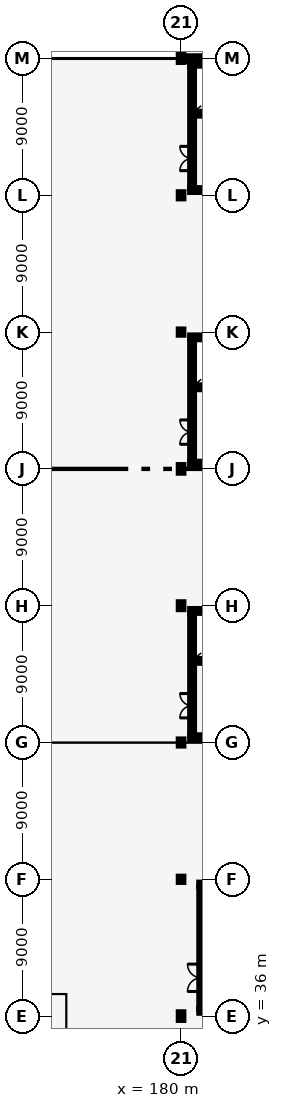
"""IFC4 building model, lengths in metres.
Left out: names, types, materials, properties, quantities, classifications, styles, units other than length and angle.
Written with IfcOpenShell. Run it as: python <this file> out.ifc"""

import sys

from ifc_helpers import new_model, si_unit, direction, frame, frame_2d, origin, origin_2d, place, context, subcontext, project, spatial, rectangle, i_section, extrude, element, fill, save


model = new_model("IFC4")
c1 = context("Model", 3, precision=1e-05, world=origin(), true_north=direction((0.0, 1.0)))
c2 = subcontext(c1, "Body", "Model", "MODEL_VIEW")
j1 = project(units=[si_unit("LENGTHUNIT", "METRE"), si_unit("PLANEANGLEUNIT", "RADIAN")], contexts=[c1])
p1 = place(None, origin())
s1 = spatial("IfcSite", under=j1, at=p1, CompositionType="ELEMENT")
p2 = place(p1, origin())
s2 = spatial("IfcBuilding", under=s1, at=p2, CompositionType="ELEMENT")
p3 = place(p2, frame((0.0, 0.0, 18.0)))
s3 = spatial("IfcBuildingStorey", under=s2, at=p3, CompositionType="ELEMENT", Elevation=18.0)
p4 = place(p3, frame((180.0, 36.0, 0.0), z_axis=(0.0, 0.0, 1.0), x_axis=(1.0, 0.0, 0.0)))
e1 = element("IfcColumn", 1, at=p4, inside=s3, PredefinedType="COLUMN", context=c2, shape_type="SweptSolid", body=[
    extrude(i_section(OverallWidth=0.3, OverallDepth=0.5, WebThickness=0.014, FlangeThickness=0.028, FilletRadius=0.027, at=origin_2d()), origin(), (0.0, 0.0, 1.0), 4.8),
])
p5 = place(p3, frame((180.0, 45.0, 0.0), z_axis=(0.0, 0.0, 1.0), x_axis=(1.0, 0.0, 0.0)))
e2 = element("IfcColumn", 2, at=p5, inside=s3, PredefinedType="COLUMN", context=c2, shape_type="SweptSolid", body=[
    extrude(i_section(OverallWidth=0.3, OverallDepth=0.34, WebThickness=0.012, FlangeThickness=0.021, FilletRadius=0.027, at=origin_2d()), origin(), (0.0, 0.0, 1.0), 4.8),
])
p6 = place(p3, frame((180.0, 54.0, 0.0), z_axis=(0.0, 0.0, 1.0), x_axis=(1.0, 0.0, 0.0)))
e3 = element("IfcColumn", 3, at=p6, inside=s3, PredefinedType="COLUMN", context=c2, shape_type="SweptSolid", body=[
    extrude(i_section(OverallWidth=0.3, OverallDepth=0.4, WebThickness=0.013, FlangeThickness=0.024, FilletRadius=0.027, at=origin_2d()), origin(), (0.0, 0.0, 1.0), 4.8),
])
p7 = place(p3, frame((180.0, 63.0, 0.0), z_axis=(0.0, 0.0, 1.0), x_axis=(1.0, 0.0, 0.0)))
e4 = element("IfcColumn", 4, at=p7, inside=s3, PredefinedType="COLUMN", context=c2, shape_type="SweptSolid", body=[
    extrude(i_section(OverallWidth=0.3, OverallDepth=0.45, WebThickness=0.014, FlangeThickness=0.026, FilletRadius=0.027, at=origin_2d()), origin(), (0.0, 0.0, 1.0), 4.8),
])
p8 = place(p3, frame((180.0, 72.0, 0.0), z_axis=(0.0, 0.0, 1.0), x_axis=(1.0, 0.0, 0.0)))
e5 = element("IfcColumn", 5, at=p8, inside=s3, PredefinedType="COLUMN", context=c2, shape_type="SweptSolid", body=[
    extrude(i_section(OverallWidth=0.3, OverallDepth=0.5, WebThickness=0.014, FlangeThickness=0.028, FilletRadius=0.027, at=origin_2d()), origin(), (0.0, 0.0, 1.0), 4.8),
])
p9 = place(p3, frame((180.0, 81.0, 0.0), z_axis=(0.0, 0.0, 1.0), x_axis=(1.0, 0.0, 0.0)))
e6 = element("IfcColumn", 6, at=p9, inside=s3, PredefinedType="COLUMN", context=c2, shape_type="SweptSolid", body=[
    extrude(i_section(OverallWidth=0.3, OverallDepth=0.34, WebThickness=0.012, FlangeThickness=0.021, FilletRadius=0.027, at=origin_2d()), origin(), (0.0, 0.0, 1.0), 4.8),
])
p10 = place(p3, frame((180.0, 90.0, 0.0), z_axis=(0.0, 0.0, 1.0), x_axis=(1.0, 0.0, 0.0)))
e7 = element("IfcColumn", 7, at=p10, inside=s3, PredefinedType="COLUMN", context=c2, shape_type="SweptSolid", body=[
    extrude(i_section(OverallWidth=0.3, OverallDepth=0.4, WebThickness=0.013, FlangeThickness=0.024, FilletRadius=0.027, at=origin_2d()), origin(), (0.0, 0.0, 1.0), 4.8),
])
p11 = place(p3, frame((180.0, 99.0, 0.0), z_axis=(0.0, 0.0, 1.0), x_axis=(1.0, 0.0, 0.0)))
e8 = element("IfcColumn", 8, at=p11, inside=s3, PredefinedType="COLUMN", context=c2, shape_type="SweptSolid", body=[
    extrude(i_section(OverallWidth=0.3, OverallDepth=0.45, WebThickness=0.014, FlangeThickness=0.026, FilletRadius=0.027, at=origin_2d()), origin(), (0.0, 0.0, 1.0), 4.8),
])
p12 = place(p3, frame((180.145, 99.0, 0.0), z_axis=(0.0, 0.0, 1.0), x_axis=(1.0, 0.0, 0.0)))
e9 = element("IfcWall", 9, at=p12, inside=s3, PredefinedType="SOLIDWALL", context=c2, shape_type="SweptSolid", body=[
    extrude(rectangle(XDim=11.71, YDim=0.29, at=frame_2d((5.855, 0.0))), origin(), (0.0, 0.0, 1.0), 3.65),
])
p13 = place(p3, frame((180.725, 54.47, 0.0), z_axis=(0.0, 0.0, 1.0), x_axis=(0.0, 1.0, 0.0)))
e10 = element("IfcWall", 10, at=p13, inside=s3, PredefinedType="SHEAR", context=c2, shape_type="SweptSolid", body=[
    extrude(rectangle(XDim=8.06, YDim=0.25, at=frame_2d((4.03, 0.0))), origin(), (0.0, 0.0, 1.0), 4.44),
])
p14 = place(p13, frame((1.15, 0.0, 0.0)))
e11 = element("IfcOpeningElement", 11, at=p14, cuts=e10, PredefinedType="OPENING", context=c2, shape_type="SweptSolid", body=[
    extrude(rectangle(XDim=1.6, YDim=2.2, at=frame_2d((0.8, 1.1))), frame((0.0, 0.135, 0.0), z_axis=(0.0, -1.0, 0.0), x_axis=(1.0, 0.0, 0.0)), (0.0, 0.0, 1.0), 0.27),
])
for number, where, z_axis, x_axis in (
    (12, (180.6, 54.345, 0.0), (0.0, 0.0, 1.0), (1.0, 0.0, 0.0)),
    (13, (180.6, 62.655, 0.0), (0.0, 0.0, 1.0), (1.0, 0.0, 0.0)),
):
    element("IfcWall", number, at=place(p3, frame(where, z_axis=z_axis, x_axis=x_axis)), inside=s3, PredefinedType="SHEAR", context=c2, shape_type="SweptSolid", body=[
        extrude(rectangle(XDim=7.8, YDim=0.25, at=frame_2d((3.9, 0.0))), origin(), (0.0, 0.0, 1.0), 4.44),
    ])
p15 = place(p3, frame((180.85, 59.37, 0.0), z_axis=(0.0, 0.0, 1.0), x_axis=(1.0, 0.0, 0.0)))
e14 = element("IfcWall", 14, at=p15, inside=s3, PredefinedType="SHEAR", context=c2, shape_type="SweptSolid", body=[
    extrude(rectangle(XDim=3.61, YDim=0.25, at=frame_2d((1.805, 0.0))), origin(), (0.0, 0.0, 1.0), 4.44),
])
p16 = place(p15, frame((0.95, 0.0, 0.0)))
e15 = element("IfcOpeningElement", 15, at=p16, cuts=e14, PredefinedType="OPENING", context=c2, shape_type="SweptSolid", body=[
    extrude(rectangle(XDim=1.2, YDim=2.2, at=frame_2d((0.6, 1.1))), frame((0.0, 0.135, 0.0), z_axis=(0.0, -1.0, 0.0), x_axis=(1.0, 0.0, 0.0)), (0.0, 0.0, 1.0), 0.27),
])
p17 = place(p3, frame((181.325, 36.47, 0.0), z_axis=(0.0, 0.0, 1.0), x_axis=(0.0, 1.0, 0.0)))
e16 = element("IfcWall", 16, at=p17, inside=s3, PredefinedType="SHEAR", context=c2, shape_type="SweptSolid", body=[
    extrude(rectangle(XDim=8.06, YDim=0.25, at=frame_2d((4.03, 0.0))), origin(), (0.0, 0.0, 1.0), 4.45),
])
p18 = place(p17, frame((1.15, 0.0, 0.0)))
e17 = element("IfcOpeningElement", 17, at=p18, cuts=e16, PredefinedType="OPENING", context=c2, shape_type="SweptSolid", body=[
    extrude(rectangle(XDim=1.8, YDim=2.2, at=frame_2d((0.9, 1.1))), frame((0.0, 0.135, 0.0), z_axis=(0.0, -1.0, 0.0), x_axis=(1.0, 0.0, 0.0)), (0.0, 0.0, 1.0), 0.27),
])
for number, where, z_axis, x_axis in (
    (18, (181.2, 36.345, 0.0), (0.0, 0.0, 1.0), (1.0, 0.0, 0.0)),
    (19, (181.2, 44.655, 0.0), (0.0, 0.0, 1.0), (1.0, 0.0, 0.0)),
):
    element("IfcWall", number, at=place(p3, frame(where, z_axis=z_axis, x_axis=x_axis)), inside=s3, PredefinedType="SHEAR", context=c2, shape_type="SweptSolid", body=[
        extrude(rectangle(XDim=7.8, YDim=0.25, at=frame_2d((3.9, 0.0))), origin(), (0.0, 0.0, 1.0), 4.45),
    ])
p19 = place(p3, frame((180.725, 72.47, 0.0), z_axis=(0.0, 0.0, 1.0), x_axis=(0.0, 1.0, 0.0)))
e20 = element("IfcWall", 20, at=p19, inside=s3, PredefinedType="SHEAR", context=c2, shape_type="SweptSolid", body=[
    extrude(rectangle(XDim=8.06, YDim=0.25, at=frame_2d((4.03, 0.0))), origin(), (0.0, 0.0, 1.0), 4.44),
])
p20 = place(p19, frame((1.15, 0.0, 0.0)))
e21 = element("IfcOpeningElement", 21, at=p20, cuts=e20, PredefinedType="OPENING", context=c2, shape_type="SweptSolid", body=[
    extrude(rectangle(XDim=1.6, YDim=2.2, at=frame_2d((0.8, 1.1))), frame((0.0, 0.135, 0.0), z_axis=(0.0, -1.0, 0.0), x_axis=(1.0, 0.0, 0.0)), (0.0, 0.0, 1.0), 0.27),
])
for number, where, z_axis, x_axis in (
    (22, (180.6, 72.345, 0.0), (0.0, 0.0, 1.0), (1.0, 0.0, 0.0)),
    (23, (180.6, 80.655, 0.0), (0.0, 0.0, 1.0), (1.0, 0.0, 0.0)),
):
    element("IfcWall", number, at=place(p3, frame(where, z_axis=z_axis, x_axis=x_axis)), inside=s3, PredefinedType="SHEAR", context=c2, shape_type="SweptSolid", body=[
        extrude(rectangle(XDim=7.8, YDim=0.25, at=frame_2d((3.9, 0.0))), origin(), (0.0, 0.0, 1.0), 4.44),
    ])
p21 = place(p3, frame((180.85, 77.37, 0.0), z_axis=(0.0, 0.0, 1.0), x_axis=(1.0, 0.0, 0.0)))
e24 = element("IfcWall", 24, at=p21, inside=s3, PredefinedType="SHEAR", context=c2, shape_type="SweptSolid", body=[
    extrude(rectangle(XDim=3.61, YDim=0.25, at=frame_2d((1.805, 0.0))), origin(), (0.0, 0.0, 1.0), 4.44),
])
p22 = place(p21, frame((0.95, 0.0, 0.0)))
e25 = element("IfcOpeningElement", 25, at=p22, cuts=e24, PredefinedType="OPENING", context=c2, shape_type="SweptSolid", body=[
    extrude(rectangle(XDim=1.2, YDim=2.2, at=frame_2d((0.6, 1.1))), frame((0.0, 0.135, 0.0), z_axis=(0.0, -1.0, 0.0), x_axis=(1.0, 0.0, 0.0)), (0.0, 0.0, 1.0), 0.27),
])
p23 = place(p3, frame((180.725, 90.47, 0.0), z_axis=(0.0, 0.0, 1.0), x_axis=(0.0, 1.0, 0.0)))
e26 = element("IfcWall", 26, at=p23, inside=s3, PredefinedType="SHEAR", context=c2, shape_type="SweptSolid", body=[
    extrude(rectangle(XDim=8.06, YDim=0.25, at=frame_2d((4.03, 0.0))), origin(), (0.0, 0.0, 1.0), 4.44),
])
p24 = place(p23, frame((1.15, 0.0, 0.0)))
e27 = element("IfcOpeningElement", 27, at=p24, cuts=e26, PredefinedType="OPENING", context=c2, shape_type="SweptSolid", body=[
    extrude(rectangle(XDim=1.6, YDim=2.2, at=frame_2d((0.8, 1.1))), frame((0.0, 0.135, 0.0), z_axis=(0.0, -1.0, 0.0), x_axis=(1.0, 0.0, 0.0)), (0.0, 0.0, 1.0), 0.27),
])
for number, where, z_axis, x_axis in (
    (28, (180.6, 90.345, 0.0), (0.0, 0.0, 1.0), (1.0, 0.0, 0.0)),
    (29, (180.6, 98.655, 0.0), (0.0, 0.0, 1.0), (1.0, 0.0, 0.0)),
):
    element("IfcWall", number, at=place(p3, frame(where, z_axis=z_axis, x_axis=x_axis)), inside=s3, PredefinedType="SHEAR", context=c2, shape_type="SweptSolid", body=[
        extrude(rectangle(XDim=7.8, YDim=0.25, at=frame_2d((3.9, 0.0))), origin(), (0.0, 0.0, 1.0), 4.44),
    ])
p25 = place(p3, frame((180.85, 95.37, 0.0), z_axis=(0.0, 0.0, 1.0), x_axis=(1.0, 0.0, 0.0)))
e30 = element("IfcWall", 30, at=p25, inside=s3, PredefinedType="SHEAR", context=c2, shape_type="SweptSolid", body=[
    extrude(rectangle(XDim=3.61, YDim=0.25, at=frame_2d((1.805, 0.0))), origin(), (0.0, 0.0, 1.0), 4.44),
])
p26 = place(p25, frame((0.95, 0.0, 0.0)))
e31 = element("IfcOpeningElement", 31, at=p26, cuts=e30, PredefinedType="OPENING", context=c2, shape_type="SweptSolid", body=[
    extrude(rectangle(XDim=1.2, YDim=2.2, at=frame_2d((0.6, 1.1))), frame((0.0, 0.135, 0.0), z_axis=(0.0, -1.0, 0.0), x_axis=(1.0, 0.0, 0.0)), (0.0, 0.0, 1.0), 0.27),
])
p27 = place(p14, origin())
e32 = element("IfcDoor", 32, at=p27, inside=s3, OperationType="DOUBLE_DOOR_SINGLE_SWING", PredefinedType="DOOR", context=c2, shape_type="SweptSolid", body=[
    extrude(rectangle(XDim=1.6, YDim=2.2, at=frame_2d((0.8, 1.1))), frame((0.0, 0.025, 0.0), z_axis=(0.0, -1.0, 0.0), x_axis=(1.0, 0.0, 0.0)), (0.0, 0.0, 1.0), 0.05),
])
fill(e11, e32)
p28 = place(p18, origin())
e33 = element("IfcDoor", 33, at=p28, inside=s3, OperationType="DOUBLE_DOOR_SINGLE_SWING", PredefinedType="DOOR", context=c2, shape_type="SweptSolid", body=[
    extrude(rectangle(XDim=1.8, YDim=2.2, at=frame_2d((0.9, 1.1))), frame((0.0, 0.025, 0.0), z_axis=(0.0, -1.0, 0.0), x_axis=(1.0, 0.0, 0.0)), (0.0, 0.0, 1.0), 0.05),
])
fill(e17, e33)
p29 = place(p20, origin())
e34 = element("IfcDoor", 34, at=p29, inside=s3, OperationType="DOUBLE_DOOR_SINGLE_SWING", PredefinedType="DOOR", context=c2, shape_type="SweptSolid", body=[
    extrude(rectangle(XDim=1.6, YDim=2.2, at=frame_2d((0.8, 1.1))), frame((0.0, 0.025, 0.0), z_axis=(0.0, -1.0, 0.0), x_axis=(1.0, 0.0, 0.0)), (0.0, 0.0, 1.0), 0.05),
])
fill(e21, e34)
p30 = place(p24, origin())
e35 = element("IfcDoor", 35, at=p30, inside=s3, OperationType="DOUBLE_DOOR_SINGLE_SWING", PredefinedType="DOOR", context=c2, shape_type="SweptSolid", body=[
    extrude(rectangle(XDim=1.6, YDim=2.2, at=frame_2d((0.8, 1.1))), frame((0.0, 0.025, 0.0), z_axis=(0.0, -1.0, 0.0), x_axis=(1.0, 0.0, 0.0)), (0.0, 0.0, 1.0), 0.05),
])
fill(e27, e35)
save(model, sys.argv[1])
